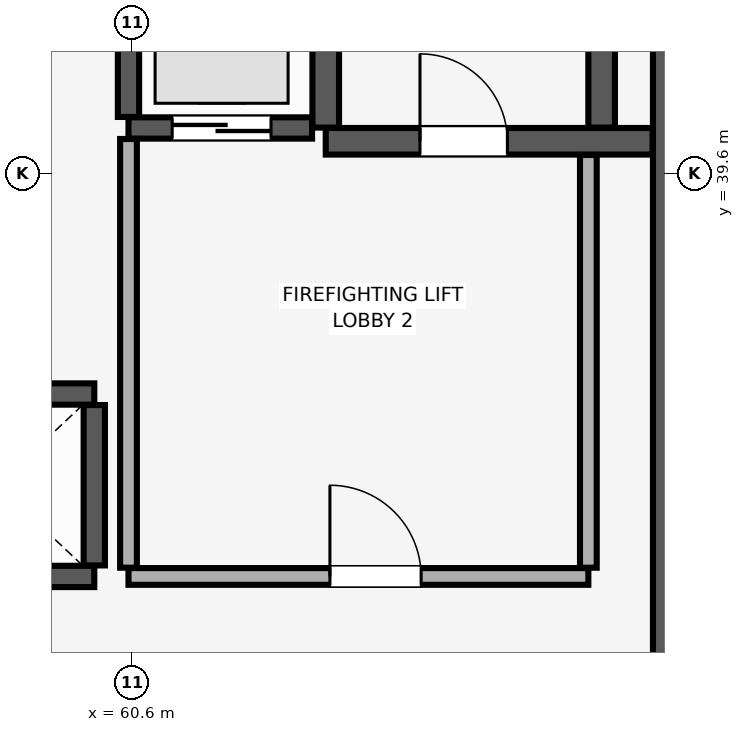
"""IFC4 building model, lengths in metres.
Left out: names, types, materials, properties, quantities, classifications, styles, units other than length and angle.
Written with IfcOpenShell. Run it as: python <this file> out.ifc"""

import sys

from ifc_helpers import new_model, si_unit, direction, frame, frame_2d, origin, place, context, subcontext, project, spatial, rectangle, extrude, element, fill, save


model = new_model("IFC4")
c1 = context("Model", 3, precision=1e-05, world=origin(), true_north=direction((0.0, 1.0)))
c2 = subcontext(c1, "Body", "Model", "MODEL_VIEW")
j1 = project(units=[si_unit("LENGTHUNIT", "METRE"), si_unit("PLANEANGLEUNIT", "RADIAN")], contexts=[c1])
p1 = place(None, origin())
s1 = spatial("IfcSite", under=j1, at=p1, CompositionType="ELEMENT")
p2 = place(p1, origin())
s2 = spatial("IfcBuilding", under=s1, at=p2, CompositionType="ELEMENT")
p3 = place(p2, frame((0.0, 0.0, 229.15)))
s3 = spatial("IfcBuildingStorey", under=s2, at=p3, CompositionType="ELEMENT", Elevation=229.15)
p4 = place(p3, frame((67.8, 29.4, 0.0), z_axis=(0.0, 0.0, 1.0), x_axis=(0.0, 1.0, 0.0)))
e1 = element("IfcWall", 1, at=p4, inside=s3, PredefinedType="SHEAR", context=c2, shape_type="SweptSolid", body=[
    extrude(rectangle(XDim=19.2, YDim=0.7, at=frame_2d((9.6, 0.0))), origin(), (0.0, 0.0, 1.0), 3.71),
])
p5 = place(p3, frame((63.145, 40.025, 0.0), z_axis=(0.0, 0.0, 1.0), x_axis=(1.0, 0.0, 0.0)))
e2 = element("IfcWall", 2, at=p5, inside=s3, PredefinedType="SHEAR", context=c2, shape_type="SweptSolid", body=[
    extrude(rectangle(XDim=4.3, YDim=0.35, at=frame_2d((2.15, 0.0))), origin(), (0.0, 0.0, 1.0), 3.71),
])
p6 = place(p5, frame((1.24, 0.0, 0.0)))
e3 = element("IfcOpeningElement", 3, at=p6, cuts=e2, PredefinedType="OPENING", context=c2, shape_type="SweptSolid", body=[
    extrude(rectangle(XDim=1.15, YDim=2.15, at=frame_2d((0.575, 1.075))), frame((0.0, 0.185, 0.0), z_axis=(0.0, -1.0, 0.0), x_axis=(1.0, 0.0, 0.0)), (0.0, 0.0, 1.0), 0.37),
])
for number, where, z_axis, x_axis in (
    (4, (63.145, 40.205, 0.0), (0.0, 0.0, 1.0), (0.0, 1.0, 0.0)),
    (5, (66.775, 40.205, 0.0), (0.0, 0.0, 1.0), (0.0, 1.0, 0.0)),
):
    element("IfcWall", number, at=place(p3, frame(where, z_axis=z_axis, x_axis=x_axis)), inside=s3, PredefinedType="SHEAR", context=c2, shape_type="SweptSolid", body=[
        extrude(rectangle(XDim=8.09, YDim=0.35, at=frame_2d((4.045, 0.0))), origin(), (0.0, 0.0, 1.0), 3.71),
    ])
for number, where, z_axis, x_axis in (
    (6, (57.55, 34.3, 0.0), (0.0, 0.0, 1.0), (1.0, 0.0, 0.0)),
    (7, (57.55, 36.7, 0.0), (0.0, 0.0, 1.0), (1.0, 0.0, 0.0)),
):
    element("IfcWall", number, at=place(p3, frame(where, z_axis=z_axis, x_axis=x_axis)), inside=s3, PredefinedType="SHEAR", context=c2, shape_type="SweptSolid", body=[
        extrude(rectangle(XDim=2.55, YDim=0.28, at=frame_2d((1.275, 0.0))), origin(), (0.0, 0.0, 1.0), 3.71),
    ])
p7 = place(p3, frame((60.1, 34.445, 0.0), z_axis=(0.0, 0.0, 1.0), x_axis=(0.0, 1.0, 0.0)))
e8 = element("IfcWall", 8, at=p7, inside=s3, PredefinedType="SHEAR", context=c2, shape_type="SweptSolid", body=[
    extrude(rectangle(XDim=2.11, YDim=0.28, at=frame_2d((1.055, 0.0))), origin(), (0.0, 0.0, 1.0), 3.71),
])
p8 = place(p3, frame((60.55, 40.2, 0.0), z_axis=(0.0, 0.0, 1.0), x_axis=(1.0, 0.0, 0.0)))
e9 = element("IfcWall", 9, at=p8, inside=s3, PredefinedType="SHEAR", context=c2, shape_type="SweptSolid", body=[
    extrude(rectangle(XDim=2.415, YDim=0.28, at=frame_2d((1.208, 0.0))), origin(), (0.0, 0.0, 1.0), 3.71),
])
p9 = place(p8, frame((0.575, 0.0, 0.0)))
e10 = element("IfcOpeningElement", 10, at=p9, cuts=e9, PredefinedType="OPENING", context=c2, shape_type="SweptSolid", body=[
    extrude(rectangle(XDim=1.3, YDim=2.3, at=frame_2d((0.65, 1.15))), frame((0.0, 0.15, 0.0), z_axis=(0.0, -1.0, 0.0), x_axis=(1.0, 0.0, 0.0)), (0.0, 0.0, 1.0), 0.3),
])
p10 = place(p3, frame((60.55, 40.345, 0.0), z_axis=(0.0, 0.0, 1.0), x_axis=(0.0, 1.0, 0.0)))
e11 = element("IfcWall", 11, at=p10, inside=s3, PredefinedType="SHEAR", context=c2, shape_type="SweptSolid", body=[
    extrude(rectangle(XDim=2.81, YDim=0.28, at=frame_2d((1.405, 0.0))), origin(), (0.0, 0.0, 1.0), 3.71),
])
p11 = place(p3, frame((60.55, 34.3, 0.0), z_axis=(0.0, 0.0, 1.0), x_axis=(1.0, 0.0, 0.0)))
e12 = element("IfcWall", 12, at=p11, inside=s3, PredefinedType="PARTITIONING", context=c2, shape_type="SweptSolid", body=[
    extrude(rectangle(XDim=6.05, YDim=0.22, at=frame_2d((3.025, 0.0))), origin(), (0.0, 0.0, 1.0), 3.71),
])
p12 = place(p11, frame((2.65, 0.0, 0.0)))
e13 = element("IfcOpeningElement", 13, at=p12, cuts=e12, PredefinedType="OPENING", context=c2, shape_type="SweptSolid", body=[
    extrude(rectangle(XDim=1.2, YDim=2.15, at=frame_2d((0.6, 1.075))), frame((0.0, 0.12, 0.0), z_axis=(0.0, -1.0, 0.0), x_axis=(1.0, 0.0, 0.0)), (0.0, 0.0, 1.0), 0.24),
])
p13 = place(p3, frame((60.55, 34.415, 0.0), z_axis=(0.0, 0.0, 1.0), x_axis=(0.0, 1.0, 0.0)))
e14 = element("IfcWall", 14, at=p13, inside=s3, PredefinedType="PARTITIONING", context=c2, shape_type="SweptSolid", body=[
    extrude(rectangle(XDim=5.64, YDim=0.22, at=frame_2d((2.82, 0.0))), origin(), (0.0, 0.0, 1.0), 3.71),
])
p14 = place(p3, frame((66.6, 34.415, 0.0), z_axis=(0.0, 0.0, 1.0), x_axis=(0.0, 1.0, 0.0)))
e15 = element("IfcWall", 15, at=p14, inside=s3, PredefinedType="PARTITIONING", context=c2, shape_type="SweptSolid", body=[
    extrude(rectangle(XDim=5.43, YDim=0.22, at=frame_2d((2.715, 0.0))), origin(), (0.0, 0.0, 1.0), 3.71),
])
p15 = place(p6, origin())
e16 = element("IfcDoor", 16, at=p15, inside=s3, OperationType="SINGLE_SWING_LEFT", PredefinedType="DOOR", context=c2, shape_type="SweptSolid", body=[
    extrude(rectangle(XDim=1.15, YDim=2.15, at=frame_2d((0.575, 1.075))), frame((0.0, 0.025, 0.0), z_axis=(0.0, -1.0, 0.0), x_axis=(1.0, 0.0, 0.0)), (0.0, 0.0, 1.0), 0.05),
])
fill(e3, e16)
p16 = place(p9, origin())
e17 = element("IfcDoor", 17, at=p16, inside=s3, OperationType="DOUBLE_DOOR_SLIDING", PredefinedType="DOOR", context=c2, shape_type="SweptSolid", body=[
    extrude(rectangle(XDim=1.3, YDim=2.3, at=frame_2d((0.65, 1.15))), frame((0.0, 0.025, 0.0), z_axis=(0.0, -1.0, 0.0), x_axis=(1.0, 0.0, 0.0)), (0.0, 0.0, 1.0), 0.05),
])
fill(e10, e17)
p17 = place(p12, origin())
e18 = element("IfcDoor", 18, at=p17, inside=s3, OperationType="SINGLE_SWING_LEFT", PredefinedType="DOOR", context=c2, shape_type="SweptSolid", body=[
    extrude(rectangle(XDim=1.2, YDim=2.15, at=frame_2d((0.6, 1.075))), frame((0.0, 0.025, 0.0), z_axis=(0.0, -1.0, 0.0), x_axis=(1.0, 0.0, 0.0)), (0.0, 0.0, 1.0), 0.05),
])
fill(e13, e18)
save(model, sys.argv[1])
